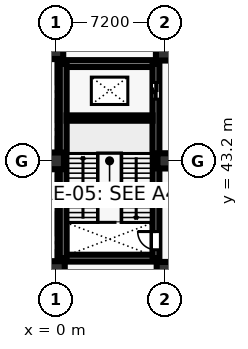
"""IFC4 building model, lengths in metres.
Left out: names, types, materials, properties, quantities, classifications, styles, units other than length and angle.
Written with IfcOpenShell. Run it as: python <this file> out.ifc"""

import sys

from ifc_helpers import new_model, si_unit, direction, frame, frame_2d, origin, origin_2d, place, context, subcontext, project, spatial, rectangle, circle, extrude, element, fill, save


model = new_model("IFC4")
c1 = context("Model", 3, precision=1e-05, world=origin(), true_north=direction((0.0, 1.0)))
c2 = subcontext(c1, "Body", "Model", "MODEL_VIEW")
j1 = project(units=[si_unit("LENGTHUNIT", "METRE"), si_unit("PLANEANGLEUNIT", "RADIAN")], contexts=[c1])
p1 = place(None, origin())
s1 = spatial("IfcSite", under=j1, at=p1, CompositionType="ELEMENT")
p2 = place(p1, origin())
s2 = spatial("IfcBuilding", under=s1, at=p2, CompositionType="ELEMENT")
p3 = place(p2, frame((0.0, 0.0, -5.4)))
s3 = spatial("IfcBuildingStorey", under=s2, at=p3, CompositionType="ELEMENT", Elevation=-5.4)
p4 = place(p3, frame((0.0, 36.0, 0.0), z_axis=(0.0, 0.0, 1.0), x_axis=(1.0, 0.0, 0.0)))
e1 = element("IfcColumn", 1, at=p4, inside=s3, PredefinedType="COLUMN", context=c2, shape_type="SweptSolid", body=[
    extrude(circle(Radius=0.6, at=origin_2d()), origin(), (0.0, 0.0, 1.0), 5.4),
])
p5 = place(p3, frame((0.0, 43.2, 0.0), z_axis=(0.0, 0.0, 1.0), x_axis=(1.0, 0.0, 0.0)))
e2 = element("IfcColumn", 2, at=p5, inside=s3, PredefinedType="COLUMN", context=c2, shape_type="SweptSolid", body=[
    extrude(rectangle(XDim=1.1, YDim=1.1, at=origin_2d()), origin(), (0.0, 0.0, 1.0), 5.4),
])
p6 = place(p3, frame((0.0, 50.4, 0.0), z_axis=(0.0, 0.0, 1.0), x_axis=(1.0, 0.0, 0.0)))
e3 = element("IfcColumn", 3, at=p6, inside=s3, PredefinedType="COLUMN", context=c2, shape_type="SweptSolid", body=[
    extrude(rectangle(XDim=1.0, YDim=1.0, at=origin_2d()), origin(), (0.0, 0.0, 1.0), 5.4),
])
p7 = place(p3, frame((7.2, 36.0, 0.0), z_axis=(0.0, 0.0, 1.0), x_axis=(1.0, 0.0, 0.0)))
e4 = element("IfcColumn", 4, at=p7, inside=s3, PredefinedType="COLUMN", context=c2, shape_type="SweptSolid", body=[
    extrude(rectangle(XDim=1.1, YDim=1.1, at=origin_2d()), origin(), (0.0, 0.0, 1.0), 5.4),
])
p8 = place(p3, frame((7.2, 43.2, 0.0), z_axis=(0.0, 0.0, 1.0), x_axis=(1.0, 0.0, 0.0)))
e5 = element("IfcColumn", 5, at=p8, inside=s3, PredefinedType="COLUMN", context=c2, shape_type="SweptSolid", body=[
    extrude(rectangle(XDim=1.0, YDim=1.0, at=origin_2d()), origin(), (0.0, 0.0, 1.0), 5.4),
])
p9 = place(p3, frame((7.2, 50.4, 0.0), z_axis=(0.0, 0.0, 1.0), x_axis=(1.0, 0.0, 0.0)))
e6 = element("IfcColumn", 6, at=p9, inside=s3, PredefinedType="COLUMN", context=c2, shape_type="SweptSolid", body=[
    extrude(circle(Radius=0.6, at=origin_2d()), origin(), (0.0, 0.0, 1.0), 5.4),
])
p10 = place(p3, frame((0.0, 0.0, 0.0), z_axis=(0.0, 0.0, 1.0), x_axis=(0.0, 1.0, 0.0)))
e7 = element("IfcWall", 7, at=p10, inside=s3, PredefinedType="USERDEFINED", context=c2, shape_type="SweptSolid", body=[
    extrude(rectangle(XDim=36.5, YDim=0.6, at=frame_2d((18.25, 0.0))), origin(), (0.0, 0.0, 1.0), 4.98),
])
p11 = place(p3, frame((0.0, 49.9, 0.0), z_axis=(0.0, 0.0, 1.0), x_axis=(0.0, 1.0, 0.0)))
e8 = element("IfcWall", 8, at=p11, inside=s3, PredefinedType="USERDEFINED", context=c2, shape_type="SweptSolid", body=[
    extrude(rectangle(XDim=29.8, YDim=0.6, at=frame_2d((14.9, 0.0))), origin(), (0.0, 0.0, 1.0), 4.98),
])
for number, where, z_axis, x_axis in (
    (9, (0.5, 36.8, 0.0), (0.0, 0.0, 1.0), (1.0, 0.0, 0.0)),
    (10, (0.5, 49.6, 0.0), (0.0, 0.0, 1.0), (1.0, 0.0, 0.0)),
):
    element("IfcWall", number, at=place(p3, frame(where, z_axis=z_axis, x_axis=x_axis)), inside=s3, PredefinedType="SHEAR", context=c2, shape_type="SweptSolid", body=[
        extrude(rectangle(XDim=6.1, YDim=0.45, at=frame_2d((3.05, 0.0))), origin(), (0.0, 0.0, 1.0), 5.02),
    ])
p12 = place(p3, frame((0.5, 36.8, 0.0), z_axis=(0.0, 0.0, 1.0), x_axis=(0.0, 1.0, 0.0)))
e11 = element("IfcWall", 11, at=p12, inside=s3, PredefinedType="SHEAR", context=c2, shape_type="SweptSolid", body=[
    extrude(rectangle(XDim=12.8, YDim=0.45, at=frame_2d((6.4, 0.0))), origin(), (0.0, 0.0, 1.0), 5.02),
])
p13 = place(p3, frame((6.6, 36.8, 0.0), z_axis=(0.0, 0.0, 1.0), x_axis=(0.0, 1.0, 0.0)))
e12 = element("IfcWall", 12, at=p13, inside=s3, PredefinedType="SHEAR", context=c2, shape_type="SweptSolid", body=[
    extrude(rectangle(XDim=12.8, YDim=0.45, at=frame_2d((6.4, 0.0))), origin(), (0.0, 0.0, 1.0), 5.02),
])
p14 = place(p13, frame((0.55, 0.0, 0.0)))
e13 = element("IfcOpeningElement", 13, at=p14, cuts=e12, PredefinedType="OPENING", context=c2, shape_type="SweptSolid", body=[
    extrude(rectangle(XDim=1.2, YDim=2.25, at=frame_2d((0.6, 1.125))), frame((0.0, 0.235, 0.0), z_axis=(0.0, -1.0, 0.0), x_axis=(1.0, 0.0, 0.0)), (0.0, 0.0, 1.0), 0.47),
])
p15 = place(p13, frame((10.458, 0.0, 0.0)))
e14 = element("IfcOpeningElement", 14, at=p15, cuts=e12, PredefinedType="OPENING", context=c2, shape_type="SweptSolid", body=[
    extrude(rectangle(XDim=1.1, YDim=2.2, at=frame_2d((0.55, 1.1))), frame((0.0, 0.235, 0.0), z_axis=(0.0, -1.0, 0.0), x_axis=(1.0, 0.0, 0.0)), (0.0, 0.0, 1.0), 0.47),
])
p16 = place(p3, frame((0.725, 46.016, 0.0), z_axis=(0.0, 0.0, 1.0), x_axis=(1.0, 0.0, 0.0)))
e15 = element("IfcWall", 15, at=p16, inside=s3, PredefinedType="SHEAR", context=c2, shape_type="SweptSolid", body=[
    extrude(rectangle(XDim=5.65, YDim=0.35, at=frame_2d((2.825, 0.0))), origin(), (0.0, 0.0, 1.0), 5.02),
])
p17 = place(p14, origin())
e16 = element("IfcDoor", 16, at=p17, inside=s3, OperationType="SINGLE_SWING_RIGHT", PredefinedType="DOOR", context=c2, shape_type="SweptSolid", body=[
    extrude(rectangle(XDim=1.2, YDim=2.25, at=frame_2d((0.6, 1.125))), frame((0.0, 0.025, 0.0), z_axis=(0.0, -1.0, 0.0), x_axis=(1.0, 0.0, 0.0)), (0.0, 0.0, 1.0), 0.05),
])
fill(e13, e16)
p18 = place(p15, origin())
e17 = element("IfcDoor", 17, at=p18, inside=s3, OperationType="SLIDING_TO_LEFT", PredefinedType="DOOR", context=c2, shape_type="SweptSolid", body=[
    extrude(rectangle(XDim=1.1, YDim=2.2, at=frame_2d((0.55, 1.1))), frame((0.0, 0.025, 0.0), z_axis=(0.0, -1.0, 0.0), x_axis=(1.0, 0.0, 0.0)), (0.0, 0.0, 1.0), 0.05),
])
fill(e14, e17)
save(model, sys.argv[1])
